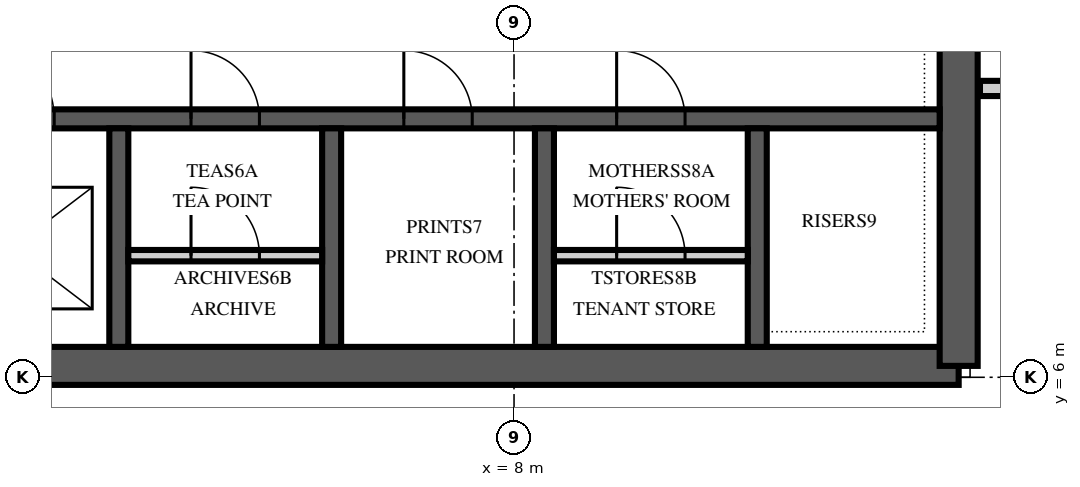
"""IFC4 building model, lengths in metres.
Left out: names, types, materials, properties, quantities, classifications, styles, units other than length and angle.
Written with IfcOpenShell. Run it as: python <this file> out.ifc"""

import sys

from ifc_helpers import new_model, si_unit, direction, frame, frame_2d, origin, place, context, subcontext, project, spatial, polyline, rectangle, outline, extrude, element, fill, save


model = new_model("IFC4")
c1 = context("Model", 3, precision=1e-05, world=origin(), true_north=direction((0.0, 1.0)))
c2 = subcontext(c1, "Body", "Model", "MODEL_VIEW")
j1 = project(units=[si_unit("LENGTHUNIT", "METRE"), si_unit("PLANEANGLEUNIT", "RADIAN")], contexts=[c1])
p1 = place(None, origin())
s1 = spatial("IfcSite", under=j1, at=p1, CompositionType="ELEMENT")
p2 = place(p1, origin())
s2 = spatial("IfcBuilding", under=s1, at=p2, CompositionType="ELEMENT")
p3 = place(p2, frame((0.0, 0.0, 312.0)))
s3 = spatial("IfcBuildingStorey", under=s2, at=p3, CompositionType="ELEMENT", Elevation=312.0)
p4 = place(p3, frame((-13.85, 6.15, 0.0), z_axis=(0.0, 0.0, 1.0), x_axis=(1.0, 0.0, 0.0)))
e1 = element("IfcWall", 1, at=p4, inside=s3, PredefinedType="SHEAR", context=c2, shape_type="SweptSolid", body=[
    extrude(rectangle(XDim=27.7, YDim=0.5, at=frame_2d((13.85, 0.0))), origin(), (0.0, 0.0, 1.0), 4.0),
])
p5 = place(p3, frame((13.85, 6.15, 0.0), z_axis=(0.0, 0.0, 1.0), x_axis=(0.0, 1.0, 0.0)))
e2 = element("IfcWall", 2, at=p5, inside=s3, PredefinedType="SHEAR", context=c2, shape_type="SweptSolid", body=[
    extrude(outline(polyline([(0.0, -0.25), (17.7, -0.25), (17.7, 0.0), (17.45, 0.0), (17.45, 0.25), (0.25, 0.25), (0.25, 0.0), (0.0, 0.0), (0.0, -0.25)])), origin(), (0.0, 0.0, 1.0), 4.0),
])
p6 = place(p5, frame((4.15, 0.0, 0.0)))
e3 = element("IfcOpeningElement", 3, at=p6, cuts=e2, PredefinedType="OPENING", context=c2, shape_type="SweptSolid", body=[
    extrude(rectangle(XDim=1.8, YDim=2.4, at=frame_2d((0.9, 1.2))), frame((0.0, 0.265, 0.0), z_axis=(0.0, -1.0, 0.0), x_axis=(1.0, 0.0, 0.0)), (0.0, 0.0, 1.0), 0.53),
])
p7 = place(p3, frame((-13.6, 9.4, 0.0), z_axis=(0.0, 0.0, 1.0), x_axis=(1.0, 0.0, 0.0)))
e4 = element("IfcWall", 4, at=p7, inside=s3, PredefinedType="SHEAR", context=c2, shape_type="SweptSolid", body=[
    extrude(rectangle(XDim=27.2, YDim=0.25, at=frame_2d((13.6, 0.0))), origin(), (0.0, 0.0, 1.0), 4.0),
])
p8 = place(p7, frame((8.85, 0.0, 0.0)))
e5 = element("IfcOpeningElement", 5, at=p8, cuts=e4, PredefinedType="OPENING", context=c2, shape_type="SweptSolid", body=[
    extrude(rectangle(XDim=1.1, YDim=2.1, at=frame_2d((0.55, 1.05))), frame((0.0, 0.14, 0.0), z_axis=(0.0, -1.0, 0.0), x_axis=(1.0, 0.0, 0.0)), (0.0, 0.0, 1.0), 0.28),
])
p9 = place(p7, frame((11.65, 0.0, 0.0)))
e6 = element("IfcOpeningElement", 6, at=p9, cuts=e4, PredefinedType="OPENING", context=c2, shape_type="SweptSolid", body=[
    extrude(rectangle(XDim=1.1, YDim=2.1, at=frame_2d((0.55, 1.05))), frame((0.0, 0.14, 0.0), z_axis=(0.0, -1.0, 0.0), x_axis=(1.0, 0.0, 0.0)), (0.0, 0.0, 1.0), 0.28),
])
p10 = place(p7, frame((14.45, 0.0, 0.0)))
e7 = element("IfcOpeningElement", 7, at=p10, cuts=e4, PredefinedType="OPENING", context=c2, shape_type="SweptSolid", body=[
    extrude(rectangle(XDim=1.1, YDim=2.1, at=frame_2d((0.55, 1.05))), frame((0.0, 0.14, 0.0), z_axis=(0.0, -1.0, 0.0), x_axis=(1.0, 0.0, 0.0)), (0.0, 0.0, 1.0), 0.28),
])
p11 = place(p7, frame((0.55, 0.0, 0.0)))
e8 = element("IfcOpeningElement", 8, at=p11, cuts=e4, PredefinedType="OPENING", context=c2, shape_type="SweptSolid", body=[
    extrude(rectangle(XDim=0.9, YDim=2.1, at=frame_2d((0.45, 1.05))), frame((0.0, 0.14, 0.0), z_axis=(0.0, -1.0, 0.0), x_axis=(1.0, 0.0, 0.0)), (0.0, 0.0, 1.0), 0.28),
])
p12 = place(p7, frame((3.35, 0.0, 0.0)))
e9 = element("IfcOpeningElement", 9, at=p12, cuts=e4, PredefinedType="OPENING", context=c2, shape_type="SweptSolid", body=[
    extrude(rectangle(XDim=0.9, YDim=2.1, at=frame_2d((0.45, 1.05))), frame((0.0, 0.14, 0.0), z_axis=(0.0, -1.0, 0.0), x_axis=(1.0, 0.0, 0.0)), (0.0, 0.0, 1.0), 0.28),
])
p13 = place(p7, frame((6.15, 0.0, 0.0)))
e10 = element("IfcOpeningElement", 10, at=p13, cuts=e4, PredefinedType="OPENING", context=c2, shape_type="SweptSolid", body=[
    extrude(rectangle(XDim=0.9, YDim=2.1, at=frame_2d((0.45, 1.05))), frame((0.0, 0.14, 0.0), z_axis=(0.0, -1.0, 0.0), x_axis=(1.0, 0.0, 0.0)), (0.0, 0.0, 1.0), 0.28),
])
p14 = place(p7, frame((17.35, 0.0, 0.0)))
e11 = element("IfcOpeningElement", 11, at=p14, cuts=e4, PredefinedType="OPENING", context=c2, shape_type="SweptSolid", body=[
    extrude(rectangle(XDim=0.9, YDim=2.1, at=frame_2d((0.45, 1.05))), frame((0.0, 0.14, 0.0), z_axis=(0.0, -1.0, 0.0), x_axis=(1.0, 0.0, 0.0)), (0.0, 0.0, 1.0), 0.28),
])
p15 = place(p7, frame((20.15, 0.0, 0.0)))
e12 = element("IfcOpeningElement", 12, at=p15, cuts=e4, PredefinedType="OPENING", context=c2, shape_type="SweptSolid", body=[
    extrude(rectangle(XDim=0.9, YDim=2.1, at=frame_2d((0.45, 1.05))), frame((0.0, 0.14, 0.0), z_axis=(0.0, -1.0, 0.0), x_axis=(1.0, 0.0, 0.0)), (0.0, 0.0, 1.0), 0.28),
])
p16 = place(p7, frame((22.95, 0.0, 0.0)))
e13 = element("IfcOpeningElement", 13, at=p16, cuts=e4, PredefinedType="OPENING", context=c2, shape_type="SweptSolid", body=[
    extrude(rectangle(XDim=0.9, YDim=2.1, at=frame_2d((0.45, 1.05))), frame((0.0, 0.14, 0.0), z_axis=(0.0, -1.0, 0.0), x_axis=(1.0, 0.0, 0.0)), (0.0, 0.0, 1.0), 0.28),
])
for number, where, z_axis, x_axis in (
    (14, (2.8, 6.4, 0.0), (0.0, 0.0, 1.0), (0.0, 1.0, 0.0)),
    (15, (5.6, 6.4, 0.0), (0.0, 0.0, 1.0), (0.0, 1.0, 0.0)),
    (16, (8.4, 6.4, 0.0), (0.0, 0.0, 1.0), (0.0, 1.0, 0.0)),
    (17, (11.2, 6.4, 0.0), (0.0, 0.0, 1.0), (0.0, 1.0, 0.0)),
):
    element("IfcWall", number, at=place(p3, frame(where, z_axis=z_axis, x_axis=x_axis)), inside=s3, PredefinedType="SHEAR", context=c2, shape_type="SweptSolid", body=[
        extrude(rectangle(XDim=2.875, YDim=0.25, at=frame_2d((1.438, 0.0))), origin(), (0.0, 0.0, 1.0), 4.0),
    ])
p17 = place(p3, frame((2.925, 7.6, 0.0), z_axis=(0.0, 0.0, 1.0), x_axis=(1.0, 0.0, 0.0)))
e18 = element("IfcWall", 18, at=p17, inside=s3, PredefinedType="PARTITIONING", context=c2, shape_type="SweptSolid", body=[
    extrude(rectangle(XDim=2.55, YDim=0.15, at=frame_2d((1.275, 0.0))), origin(), (0.0, 0.0, 1.0), 3.85),
])
p18 = place(p17, frame((0.825, 0.0, 0.0)))
e19 = element("IfcOpeningElement", 19, at=p18, cuts=e18, PredefinedType="OPENING", context=c2, shape_type="SweptSolid", body=[
    extrude(rectangle(XDim=0.9, YDim=2.1, at=frame_2d((0.45, 1.05))), frame((0.0, 0.09, 0.0), z_axis=(0.0, -1.0, 0.0), x_axis=(1.0, 0.0, 0.0)), (0.0, 0.0, 1.0), 0.18),
])
p19 = place(p3, frame((8.525, 7.6, 0.0), z_axis=(0.0, 0.0, 1.0), x_axis=(1.0, 0.0, 0.0)))
e20 = element("IfcWall", 20, at=p19, inside=s3, PredefinedType="PARTITIONING", context=c2, shape_type="SweptSolid", body=[
    extrude(rectangle(XDim=2.55, YDim=0.15, at=frame_2d((1.275, 0.0))), origin(), (0.0, 0.0, 1.0), 3.85),
])
p20 = place(p19, frame((0.825, 0.0, 0.0)))
e21 = element("IfcOpeningElement", 21, at=p20, cuts=e20, PredefinedType="OPENING", context=c2, shape_type="SweptSolid", body=[
    extrude(rectangle(XDim=0.9, YDim=2.1, at=frame_2d((0.45, 1.05))), frame((0.0, 0.09, 0.0), z_axis=(0.0, -1.0, 0.0), x_axis=(1.0, 0.0, 0.0)), (0.0, 0.0, 1.0), 0.18),
])
p21 = place(p3, frame((14.13, 9.8, 0.0), z_axis=(0.0, 0.0, 1.0), x_axis=(1.0, 0.0, 0.0)))
e22 = element("IfcWall", 22, at=p21, inside=s3, PredefinedType="PARTITIONING", context=c2, shape_type="SweptSolid", body=[
    extrude(rectangle(XDim=2.02, YDim=0.2, at=frame_2d((1.01, 0.0))), origin(), (0.0, 0.0, 1.0), 3.85),
])
p22 = place(p10, origin())
e23 = element("IfcDoor", 23, at=p22, inside=s3, OperationType="SLIDING_TO_LEFT", PredefinedType="DOOR", context=c2, shape_type="SweptSolid", body=[
    extrude(rectangle(XDim=1.1, YDim=2.1, at=frame_2d((0.55, 1.05))), frame((0.0, 0.125, 0.0), z_axis=(0.0, -1.0, 0.0), x_axis=(1.0, 0.0, 0.0)), (0.0, 0.0, 1.0), 0.25),
])
fill(e7, e23)
p23 = place(p14, origin())
e24 = element("IfcDoor", 24, at=p23, inside=s3, OperationType="SINGLE_SWING_LEFT", PredefinedType="DOOR", context=c2, shape_type="SweptSolid", body=[
    extrude(rectangle(XDim=0.9, YDim=2.1, at=frame_2d((0.45, 1.05))), frame((0.0, 0.125, 0.0), z_axis=(0.0, -1.0, 0.0), x_axis=(1.0, 0.0, 0.0)), (0.0, 0.0, 1.0), 0.25),
])
fill(e11, e24)
p24 = place(p18, origin())
e25 = element("IfcDoor", 25, at=p24, inside=s3, OperationType="SINGLE_SWING_LEFT", PredefinedType="DOOR", context=c2, shape_type="SweptSolid", body=[
    extrude(rectangle(XDim=0.9, YDim=2.1, at=frame_2d((0.45, 1.05))), frame((0.0, 0.075, 0.0), z_axis=(0.0, -1.0, 0.0), x_axis=(1.0, 0.0, 0.0)), (0.0, 0.0, 1.0), 0.149),
])
fill(e19, e25)
p25 = place(p15, origin())
e26 = element("IfcDoor", 26, at=p25, inside=s3, OperationType="SINGLE_SWING_LEFT", PredefinedType="DOOR", context=c2, shape_type="SweptSolid", body=[
    extrude(rectangle(XDim=0.9, YDim=2.1, at=frame_2d((0.45, 1.05))), frame((0.0, 0.125, 0.0), z_axis=(0.0, -1.0, 0.0), x_axis=(1.0, 0.0, 0.0)), (0.0, 0.0, 1.0), 0.25),
])
fill(e12, e26)
p26 = place(p16, origin())
e27 = element("IfcDoor", 27, at=p26, inside=s3, OperationType="SINGLE_SWING_LEFT", PredefinedType="DOOR", context=c2, shape_type="SweptSolid", body=[
    extrude(rectangle(XDim=0.9, YDim=2.1, at=frame_2d((0.45, 1.05))), frame((0.0, 0.125, 0.0), z_axis=(0.0, -1.0, 0.0), x_axis=(1.0, 0.0, 0.0)), (0.0, 0.0, 1.0), 0.25),
])
fill(e13, e27)
p27 = place(p20, origin())
e28 = element("IfcDoor", 28, at=p27, inside=s3, OperationType="SINGLE_SWING_LEFT", PredefinedType="DOOR", context=c2, shape_type="SweptSolid", body=[
    extrude(rectangle(XDim=0.9, YDim=2.1, at=frame_2d((0.45, 1.05))), frame((0.0, 0.075, 0.0), z_axis=(0.0, -1.0, 0.0), x_axis=(1.0, 0.0, 0.0)), (0.0, 0.0, 1.0), 0.149),
])
fill(e21, e28)
save(model, sys.argv[1])
